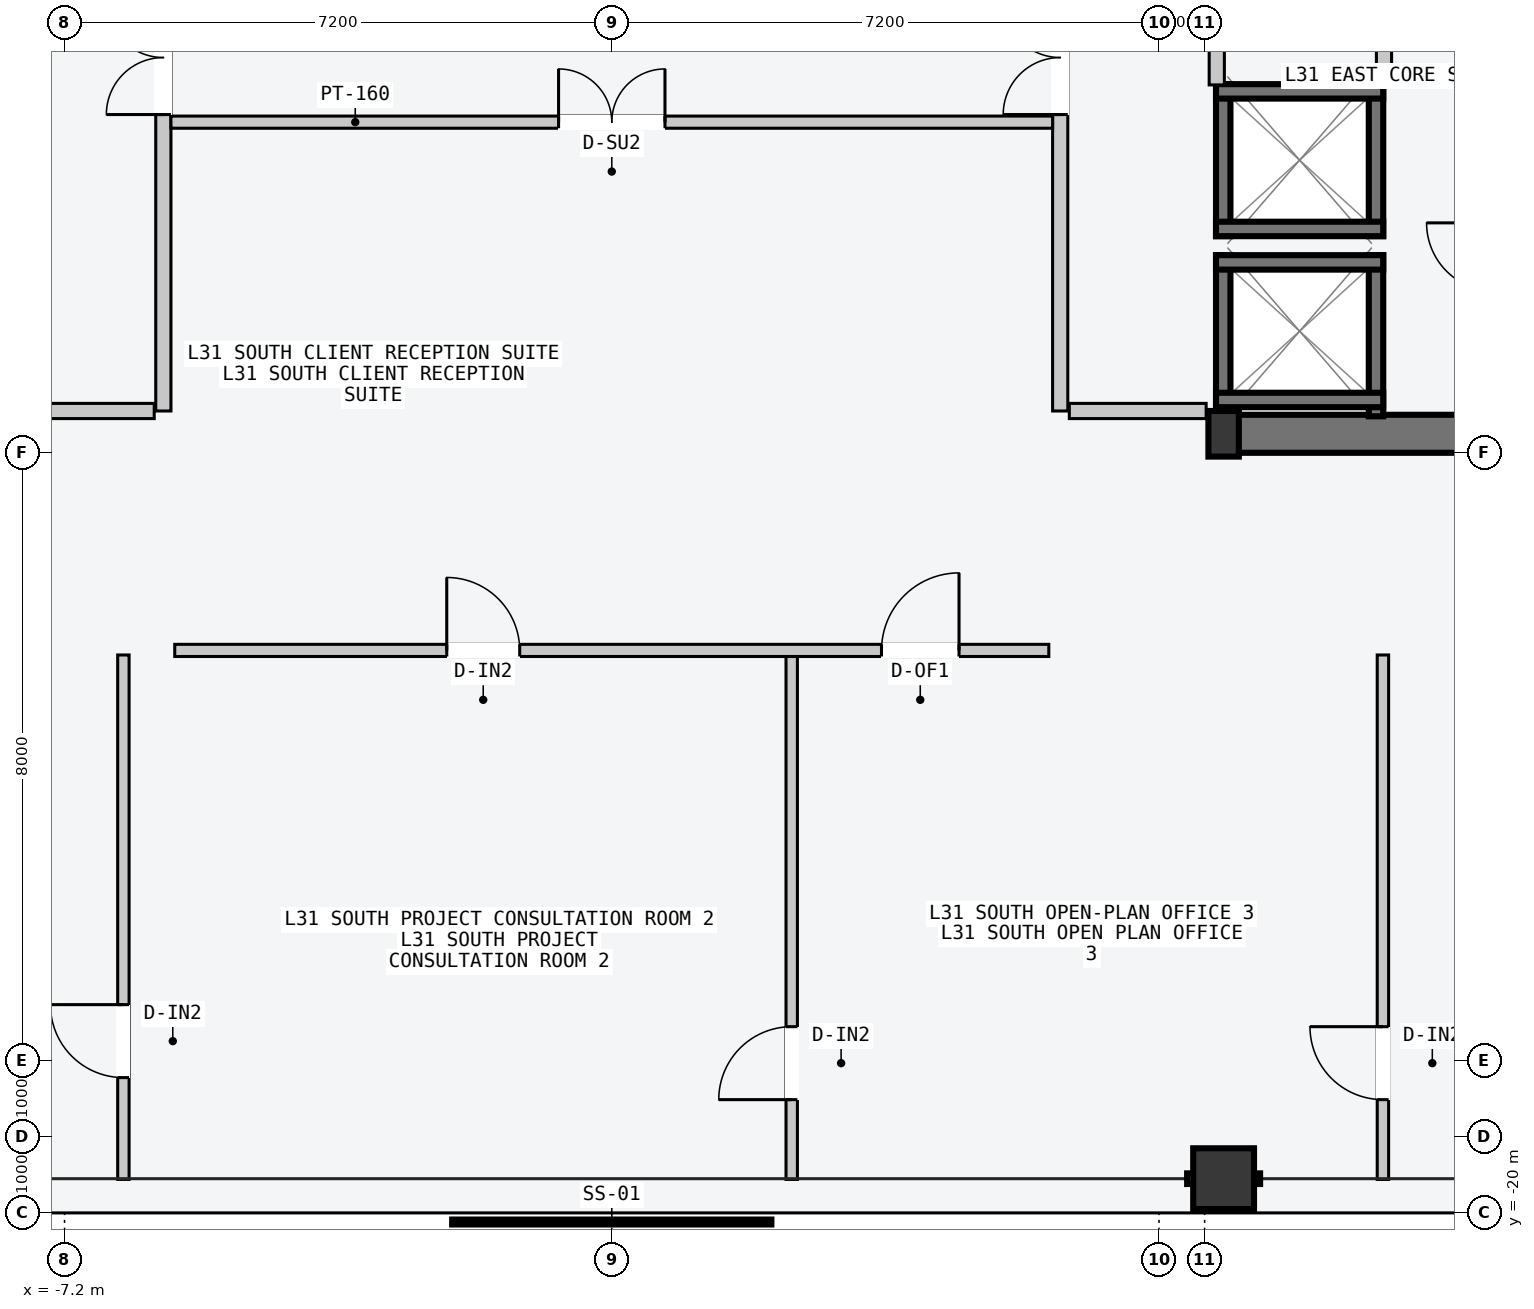
"""IFC4 building model, lengths in metres.
Left out: names, types, materials, properties, quantities, classifications, styles, units other than length and angle.
Written with IfcOpenShell. Run it as: python <this file> out.ifc"""

import sys

from ifc_helpers import new_model, si_unit, direction, frame, frame_2d, origin, origin_2d, place, context, subcontext, project, spatial, rectangle, hollow_rectangle, i_section, extrude, element, fill, save


model = new_model("IFC4")
c1 = context("Model", 3, precision=1e-05, world=origin(), true_north=direction((0.0, 1.0)))
c2 = subcontext(c1, "Body", "Model", "MODEL_VIEW")
j1 = project(units=[si_unit("LENGTHUNIT", "METRE"), si_unit("PLANEANGLEUNIT", "RADIAN")], contexts=[c1])
p1 = place(None, origin())
s1 = spatial("IfcSite", under=j1, at=p1, CompositionType="ELEMENT")
p2 = place(p1, origin())
s2 = spatial("IfcBuilding", under=s1, at=p2, CompositionType="ELEMENT")
p3 = place(p2, frame((0.0, 0.0, 120.6)))
s3 = spatial("IfcBuildingStorey", under=s2, at=p3, CompositionType="ELEMENT", Elevation=120.6)
p4 = place(p3, frame((8.07, -9.75, -0.2), z_axis=(0.0, 0.0, 1.0), x_axis=(1.0, 0.0, 0.0)))
e1 = element("IfcWall", 1, at=p4, inside=s3, PredefinedType="SHEAR", context=c2, shape_type="SweptSolid", body=[
    extrude(rectangle(XDim=6.46, YDim=0.5, at=frame_2d((3.23, 0.0))), origin(), (0.0, 0.0, 1.0), 3.6),
])
p5 = place(p3, frame((8.05, -9.75, 0.0), z_axis=(0.0, 0.0, 1.0), x_axis=(1.0, 0.0, 0.0)))
e2 = element("IfcColumn", 2, at=p5, inside=s3, PredefinedType="COLUMN", context=c2, shape_type="SweptSolid", body=[
    extrude(i_section(OverallWidth=0.4, OverallDepth=0.6, WebThickness=0.022, FlangeThickness=0.036, at=origin_2d()), origin(), (0.0, 0.0, 1.0), 3.6),
])
p6 = place(p3, frame((8.05, -19.55, 0.0), z_axis=(0.0, 0.0, 1.0), x_axis=(1.0, 0.0, 0.0)))
e3 = element("IfcColumn", 3, at=p6, inside=s3, PredefinedType="COLUMN", context=c2, shape_type="SweptSolid", body=[
    extrude(hollow_rectangle(XDim=0.8, YDim=0.8, WallThickness=0.036, at=origin_2d()), origin(), (0.0, 0.0, 1.0), 3.6),
])
for number, where, z_axis, x_axis in (
    (4, (8.045, -9.52, -0.2), (0.0, 0.0, 1.0), (0.0, 1.0, 0.0)),
    (5, (10.055, -9.52, -0.2), (0.0, 0.0, 1.0), (0.0, 1.0, 0.0)),
):
    element("IfcWall", number, at=place(p3, frame(where, z_axis=z_axis, x_axis=x_axis)), inside=s3, PredefinedType="SOLIDWALL", context=c2, shape_type="SweptSolid", body=[
        extrude(rectangle(XDim=2.12, YDim=0.19, at=frame_2d((1.06, 0.0))), origin(), (0.0, 0.0, 1.0), 3.6),
    ])
for number, where, z_axis, x_axis in (
    (6, (7.95, -7.495, -0.2), (0.0, 0.0, 1.0), (1.0, 0.0, 0.0)),
    (7, (7.95, -9.305, -0.2), (0.0, 0.0, 1.0), (1.0, 0.0, 0.0)),
):
    element("IfcWall", number, at=place(p3, frame(where, z_axis=z_axis, x_axis=x_axis)), inside=s3, PredefinedType="SOLIDWALL", context=c2, shape_type="SweptSolid", body=[
        extrude(rectangle(XDim=2.2, YDim=0.19, at=frame_2d((1.1, 0.0))), origin(), (0.0, 0.0, 1.0), 3.6),
    ])
for number, where, z_axis, x_axis in (
    (8, (8.045, -7.15, -0.2), (0.0, 0.0, 1.0), (0.0, 1.0, 0.0)),
    (9, (10.055, -7.15, -0.2), (0.0, 0.0, 1.0), (0.0, 1.0, 0.0)),
):
    element("IfcWall", number, at=place(p3, frame(where, z_axis=z_axis, x_axis=x_axis)), inside=s3, PredefinedType="SOLIDWALL", context=c2, shape_type="SweptSolid", body=[
        extrude(rectangle(XDim=2.0, YDim=0.19, at=frame_2d((1.0, 0.0))), origin(), (0.0, 0.0, 1.0), 3.6),
    ])
for number, where, z_axis, x_axis in (
    (10, (7.95, -5.245, -0.2), (0.0, 0.0, 1.0), (1.0, 0.0, 0.0)),
    (11, (7.95, -7.055, -0.2), (0.0, 0.0, 1.0), (1.0, 0.0, 0.0)),
):
    element("IfcWall", number, at=place(p3, frame(where, z_axis=z_axis, x_axis=x_axis)), inside=s3, PredefinedType="SOLIDWALL", context=c2, shape_type="SweptSolid", body=[
        extrude(rectangle(XDim=2.2, YDim=0.19, at=frame_2d((1.1, 0.0))), origin(), (0.0, 0.0, 1.0), 3.6),
    ])
p7 = place(p3, frame((-5.9, -9.45, 0.0), z_axis=(0.0, 0.0, 1.0), x_axis=(0.0, 1.0, 0.0)))
e12 = element("IfcWall", 12, at=p7, inside=s3, PredefinedType="PARTITIONING", context=c2, shape_type="SweptSolid", body=[
    extrude(rectangle(XDim=10.5, YDim=0.2, at=frame_2d((5.25, 0.0))), origin(), (0.0, 0.0, 1.0), 3.4),
])
p8 = place(p7, frame((3.9, 0.0, 0.0)))
e13 = element("IfcOpeningElement", 13, at=p8, cuts=e12, PredefinedType="OPENING", context=c2, shape_type="SweptSolid", body=[
    extrude(rectangle(XDim=1.5, YDim=2.2, at=frame_2d((0.75, 1.1))), frame((0.0, 0.11, 0.0), z_axis=(0.0, -1.0, 0.0), x_axis=(1.0, 0.0, 0.0)), (0.0, 0.0, 1.0), 0.22),
])
p9 = place(p3, frame((-6.02, -9.45, 0.0), z_axis=(0.0, 0.0, 1.0), x_axis=(-1.0, 0.0, 0.0)))
e14 = element("IfcWall", 14, at=p9, inside=s3, PredefinedType="PARTITIONING", context=c2, shape_type="SweptSolid", body=[
    extrude(rectangle(XDim=1.8, YDim=0.2, at=frame_2d((0.9, 0.0))), origin(), (0.0, 0.0, 1.0), 3.4),
])
p10 = place(p3, frame((5.9, -9.45, 0.0), z_axis=(0.0, 0.0, 1.0), x_axis=(0.0, 1.0, 0.0)))
e15 = element("IfcWall", 15, at=p10, inside=s3, PredefinedType="PARTITIONING", context=c2, shape_type="SweptSolid", body=[
    extrude(rectangle(XDim=18.9, YDim=0.2, at=frame_2d((9.45, 0.0))), origin(), (0.0, 0.0, 1.0), 3.4),
])
p11 = place(p10, frame((3.9, 0.0, 0.0)))
e16 = element("IfcOpeningElement", 16, at=p11, cuts=e15, PredefinedType="OPENING", context=c2, shape_type="SweptSolid", body=[
    extrude(rectangle(XDim=1.5, YDim=2.2, at=frame_2d((0.75, 1.1))), frame((0.0, 0.11, 0.0), z_axis=(0.0, -1.0, 0.0), x_axis=(1.0, 0.0, 0.0)), (0.0, 0.0, 1.0), 0.22),
])
p12 = place(p3, frame((6.02, -9.45, 0.0), z_axis=(0.0, 0.0, 1.0), x_axis=(1.0, 0.0, 0.0)))
e17 = element("IfcWall", 17, at=p12, inside=s3, PredefinedType="PARTITIONING", context=c2, shape_type="SweptSolid", body=[
    extrude(rectangle(XDim=1.8, YDim=0.2, at=frame_2d((0.9, 0.0))), origin(), (0.0, 0.0, 1.0), 3.4),
])
for number, where, z_axis, x_axis in (
    (18, (7.96, -5.16, 0.0), (0.0, 0.0, 1.0), (0.0, 1.0, 0.0)),
    (19, (10.16, -5.16, 0.0), (0.0, 0.0, 1.0), (0.0, 1.0, 0.0)),
):
    element("IfcWall", number, at=place(p3, frame(where, z_axis=z_axis, x_axis=x_axis)), inside=s3, PredefinedType="PARTITIONING", context=c2, shape_type="SweptSolid", body=[
        extrude(rectangle(XDim=2.44, YDim=0.2, at=frame_2d((1.22, 0.0))), origin(), (0.0, 0.0, 1.0), 3.4),
    ])
p13 = place(p3, frame((-5.8, -5.65, 0.0), z_axis=(0.0, 0.0, 1.0), x_axis=(1.0, 0.0, 0.0)))
e20 = element("IfcWall", 20, at=p13, inside=s3, PredefinedType="PARTITIONING", context=c2, shape_type="SweptSolid", body=[
    extrude(rectangle(XDim=11.6, YDim=0.16, at=frame_2d((5.8, 0.0))), origin(), (0.0, 0.0, 1.0), 3.4),
])
p14 = place(p13, frame((5.1, 0.0, 0.0)))
e21 = element("IfcOpeningElement", 21, at=p14, cuts=e20, PredefinedType="OPENING", context=c2, shape_type="SweptSolid", body=[
    extrude(rectangle(XDim=1.4, YDim=2.2, at=frame_2d((0.7, 1.1))), frame((0.0, 0.09, 0.0), z_axis=(0.0, -1.0, 0.0), x_axis=(1.0, 0.0, 0.0)), (0.0, 0.0, 1.0), 0.18),
])
p15 = place(p3, frame((-6.426, -19.56, 0.0), z_axis=(0.0, 0.0, 1.0), x_axis=(0.0, 1.0, 0.0)))
e22 = element("IfcWall", 22, at=p15, inside=s3, PredefinedType="PARTITIONING", context=c2, shape_type="SweptSolid", body=[
    extrude(rectangle(XDim=6.9, YDim=0.15, at=frame_2d((3.45, 0.0))), origin(), (0.0, 0.0, 1.0), 3.4),
])
p16 = place(p15, frame((1.34, 0.0, 0.0)))
e23 = element("IfcOpeningElement", 23, at=p16, cuts=e22, PredefinedType="OPENING", context=c2, shape_type="SweptSolid", body=[
    extrude(rectangle(XDim=0.96, YDim=2.18, at=frame_2d((0.48, 1.09))), frame((0.0, 0.085, 0.0), z_axis=(0.0, -1.0, 0.0), x_axis=(1.0, 0.0, 0.0)), (0.0, 0.0, 1.0), 0.17),
])
p17 = place(p3, frame((2.367, -19.56, 0.0), z_axis=(0.0, 0.0, 1.0), x_axis=(0.0, 1.0, 0.0)))
e24 = element("IfcWall", 24, at=p17, inside=s3, PredefinedType="PARTITIONING", context=c2, shape_type="SweptSolid", body=[
    extrude(rectangle(XDim=6.9, YDim=0.15, at=frame_2d((3.45, 0.0))), origin(), (0.0, 0.0, 1.0), 3.4),
])
p18 = place(p17, frame((1.05, 0.0, 0.0)))
e25 = element("IfcOpeningElement", 25, at=p18, cuts=e24, PredefinedType="OPENING", context=c2, shape_type="SweptSolid", body=[
    extrude(rectangle(XDim=0.96, YDim=2.18, at=frame_2d((0.48, 1.09))), frame((0.0, 0.085, 0.0), z_axis=(0.0, -1.0, 0.0), x_axis=(1.0, 0.0, 0.0)), (0.0, 0.0, 1.0), 0.17),
])
p19 = place(p3, frame((10.146, -19.56, 0.0), z_axis=(0.0, 0.0, 1.0), x_axis=(0.0, 1.0, 0.0)))
e26 = element("IfcWall", 26, at=p19, inside=s3, PredefinedType="PARTITIONING", context=c2, shape_type="SweptSolid", body=[
    extrude(rectangle(XDim=6.9, YDim=0.15, at=frame_2d((3.45, 0.0))), origin(), (0.0, 0.0, 1.0), 3.4),
])
p20 = place(p19, frame((1.05, 0.0, 0.0)))
e27 = element("IfcOpeningElement", 27, at=p20, cuts=e26, PredefinedType="OPENING", context=c2, shape_type="SweptSolid", body=[
    extrude(rectangle(XDim=0.96, YDim=2.18, at=frame_2d((0.48, 1.09))), frame((0.0, 0.085, 0.0), z_axis=(0.0, -1.0, 0.0), x_axis=(1.0, 0.0, 0.0)), (0.0, 0.0, 1.0), 0.17),
])
p21 = place(p3, frame((-5.75, -12.6, 0.0), z_axis=(0.0, 0.0, 1.0), x_axis=(1.0, 0.0, 0.0)))
e28 = element("IfcWall", 28, at=p21, inside=s3, PredefinedType="PARTITIONING", context=c2, shape_type="SweptSolid", body=[
    extrude(rectangle(XDim=11.5, YDim=0.16, at=frame_2d((5.75, 0.0))), origin(), (0.0, 0.0, 1.0), 3.4),
])
p22 = place(p21, frame((3.579, 0.0, 0.0)))
e29 = element("IfcOpeningElement", 29, at=p22, cuts=e28, PredefinedType="OPENING", context=c2, shape_type="SweptSolid", body=[
    extrude(rectangle(XDim=0.96, YDim=2.18, at=frame_2d((0.48, 1.09))), frame((0.0, 0.09, 0.0), z_axis=(0.0, -1.0, 0.0), x_axis=(1.0, 0.0, 0.0)), (0.0, 0.0, 1.0), 0.18),
])
p23 = place(p21, frame((9.299, 0.0, 0.0)))
e30 = element("IfcOpeningElement", 30, at=p23, cuts=e28, PredefinedType="OPENING", context=c2, shape_type="SweptSolid", body=[
    extrude(rectangle(XDim=1.02, YDim=2.2, at=frame_2d((0.51, 1.1))), frame((0.0, 0.09, 0.0), z_axis=(0.0, -1.0, 0.0), x_axis=(1.0, 0.0, 0.0)), (0.0, 0.0, 1.0), 0.18),
])
p24 = place(p8, origin())
e31 = element("IfcDoor", 31, at=p24, inside=s3, OperationType="DOUBLE_DOOR_SINGLE_SWING", PredefinedType="DOOR", context=c2, shape_type="SweptSolid", body=[
    extrude(rectangle(XDim=1.5, YDim=2.2, at=frame_2d((0.75, 1.1))), frame((0.0, 0.025, 0.0), z_axis=(0.0, -1.0, 0.0), x_axis=(1.0, 0.0, 0.0)), (0.0, 0.0, 1.0), 0.05),
])
fill(e13, e31)
p25 = place(p11, origin())
e32 = element("IfcDoor", 32, at=p25, inside=s3, OperationType="DOUBLE_DOOR_SINGLE_SWING", PredefinedType="DOOR", context=c2, shape_type="SweptSolid", body=[
    extrude(rectangle(XDim=1.5, YDim=2.2, at=frame_2d((0.75, 1.1))), frame((0.0, 0.025, 0.0), z_axis=(0.0, -1.0, 0.0), x_axis=(1.0, 0.0, 0.0)), (0.0, 0.0, 1.0), 0.05),
])
fill(e16, e32)
p26 = place(p14, origin())
e33 = element("IfcDoor", 33, at=p26, inside=s3, OperationType="DOUBLE_DOOR_SINGLE_SWING", PredefinedType="DOOR", context=c2, shape_type="SweptSolid", body=[
    extrude(rectangle(XDim=1.4, YDim=2.2, at=frame_2d((0.7, 1.1))), frame((0.0, 0.025, 0.0), z_axis=(0.0, -1.0, 0.0), x_axis=(1.0, 0.0, 0.0)), (0.0, 0.0, 1.0), 0.05),
])
fill(e21, e33)
p27 = place(p16, origin())
e34 = element("IfcDoor", 34, at=p27, inside=s3, OperationType="SINGLE_SWING_RIGHT", PredefinedType="DOOR", context=c2, shape_type="SweptSolid", body=[
    extrude(rectangle(XDim=0.96, YDim=2.18, at=frame_2d((0.48, 1.09))), frame((0.0, 0.025, 0.0), z_axis=(0.0, -1.0, 0.0), x_axis=(1.0, 0.0, 0.0)), (0.0, 0.0, 1.0), 0.05),
])
fill(e23, e34)
p28 = place(p18, origin())
e35 = element("IfcDoor", 35, at=p28, inside=s3, OperationType="SINGLE_SWING_LEFT", PredefinedType="DOOR", context=c2, shape_type="SweptSolid", body=[
    extrude(rectangle(XDim=0.96, YDim=2.18, at=frame_2d((0.48, 1.09))), frame((0.0, 0.025, 0.0), z_axis=(0.0, -1.0, 0.0), x_axis=(1.0, 0.0, 0.0)), (0.0, 0.0, 1.0), 0.05),
])
fill(e25, e35)
p29 = place(p20, origin())
e36 = element("IfcDoor", 36, at=p29, inside=s3, OperationType="SINGLE_SWING_RIGHT", PredefinedType="DOOR", context=c2, shape_type="SweptSolid", body=[
    extrude(rectangle(XDim=0.96, YDim=2.18, at=frame_2d((0.48, 1.09))), frame((0.0, 0.025, 0.0), z_axis=(0.0, -1.0, 0.0), x_axis=(1.0, 0.0, 0.0)), (0.0, 0.0, 1.0), 0.05),
])
fill(e27, e36)
p30 = place(p22, origin())
e37 = element("IfcDoor", 37, at=p30, inside=s3, OperationType="SINGLE_SWING_LEFT", PredefinedType="DOOR", context=c2, shape_type="SweptSolid", body=[
    extrude(rectangle(XDim=0.96, YDim=2.18, at=frame_2d((0.48, 1.09))), frame((0.0, 0.025, 0.0), z_axis=(0.0, -1.0, 0.0), x_axis=(1.0, 0.0, 0.0)), (0.0, 0.0, 1.0), 0.05),
])
fill(e29, e37)
p31 = place(p23, origin())
e38 = element("IfcDoor", 38, at=p31, inside=s3, OperationType="SINGLE_SWING_RIGHT", PredefinedType="DOOR", context=c2, shape_type="SweptSolid", body=[
    extrude(rectangle(XDim=1.02, YDim=2.2, at=frame_2d((0.51, 1.1))), frame((0.0, 0.025, 0.0), z_axis=(0.0, -1.0, 0.0), x_axis=(1.0, 0.0, 0.0)), (0.0, 0.0, 1.0), 0.05),
])
fill(e30, e38)
save(model, sys.argv[1])
